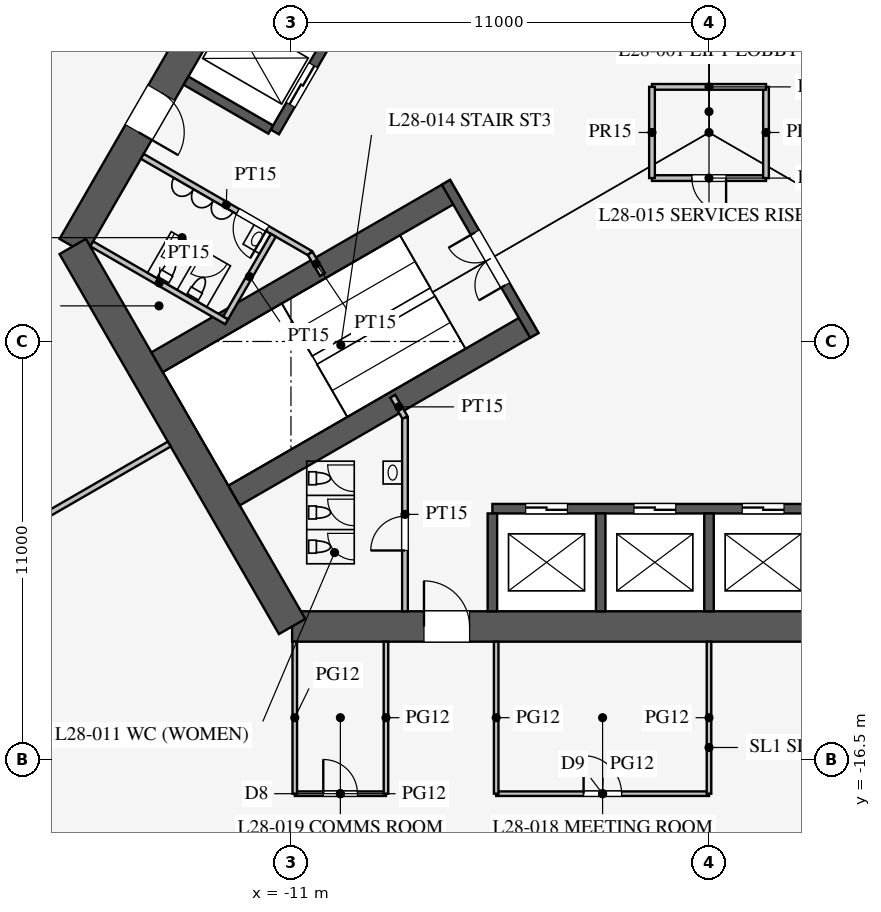
"""IFC4 building model, lengths in metres.
Left out: names, types, materials, properties, quantities, classifications, styles, units other than length and angle.
Written with IfcOpenShell. Run it as: python <this file> out.ifc"""

import sys

from ifc_helpers import new_model, si_unit, direction, frame, frame_2d, origin, place, context, subcontext, project, spatial, rectangle, extrude, element, fill, save


model = new_model("IFC4")
c1 = context("Model", 3, precision=1e-05, world=origin(), true_north=direction((0.0, 1.0)))
c2 = subcontext(c1, "Body", "Model", "MODEL_VIEW")
j1 = project(units=[si_unit("LENGTHUNIT", "METRE"), si_unit("PLANEANGLEUNIT", "RADIAN")], contexts=[c1])
p1 = place(None, origin())
s1 = spatial("IfcSite", under=j1, at=p1, CompositionType="ELEMENT")
p2 = place(p1, origin())
s2 = spatial("IfcBuilding", under=s1, at=p2, CompositionType="ELEMENT")
p3 = place(p2, frame((0.0, 0.0, 124.1)))
s3 = spatial("IfcBuildingStorey", under=s2, at=p3, CompositionType="ELEMENT", Elevation=124.1)
p4 = place(p3, frame((-10.97, -13.0, 0.0), z_axis=(0.0, 0.0, 1.0), x_axis=(1.0, 0.0, 0.0)))
e1 = element("IfcWall", 1, at=p4, inside=s3, PredefinedType="SHEAR", context=c2, shape_type="SweptSolid", body=[
    extrude(rectangle(XDim=21.939, YDim=0.8, at=frame_2d((10.97, 0.0))), origin(), (0.0, 0.0, 1.0), 4.2),
])
p5 = place(p4, frame((17.27, 0.0, 0.0)))
e2 = element("IfcOpeningElement", 2, at=p5, cuts=e1, PredefinedType="OPENING", context=c2, shape_type="SweptSolid", body=[
    extrude(rectangle(XDim=1.2, YDim=2.1, at=frame_2d((0.6, 1.05))), frame((0.0, 0.41, 0.0), z_axis=(0.0, -1.0, 0.0), x_axis=(1.0, 0.0, 0.0)), (0.0, 0.0, 1.0), 0.82),
])
p6 = place(p4, frame((3.47, 0.0, 0.0)))
e3 = element("IfcOpeningElement", 3, at=p6, cuts=e1, PredefinedType="OPENING", context=c2, shape_type="SweptSolid", body=[
    extrude(rectangle(XDim=1.2, YDim=2.1, at=frame_2d((0.6, 1.05))), frame((0.0, 0.41, 0.0), z_axis=(0.0, -1.0, 0.0), x_axis=(1.0, 0.0, 0.0)), (0.0, 0.0, 1.0), 0.82),
])
p7 = place(p3, frame((-5.773, 16.0, 0.0), z_axis=(0.0, 0.0, 1.0), x_axis=(-0.500002442456, -0.866023993627, 0.0)))
e4 = element("IfcWall", 4, at=p7, inside=s3, PredefinedType="SHEAR", context=c2, shape_type="SweptSolid", body=[
    extrude(rectangle(XDim=21.939, YDim=0.8, at=frame_2d((10.97, 0.0))), origin(), (0.0, 0.0, 1.0), 4.2),
])
p8 = place(p7, frame((17.27, 0.0, 0.0)))
e5 = element("IfcOpeningElement", 5, at=p8, cuts=e4, PredefinedType="OPENING", context=c2, shape_type="SweptSolid", body=[
    extrude(rectangle(XDim=1.2, YDim=2.1, at=frame_2d((0.6, 1.05))), frame((0.0, 0.41, 0.0), z_axis=(0.0, -1.0, 0.0), x_axis=(1.0, 0.0, 0.0)), (0.0, 0.0, 1.0), 0.82),
])
p9 = place(p7, frame((3.47, 0.0, 0.0)))
e6 = element("IfcOpeningElement", 6, at=p9, cuts=e4, PredefinedType="OPENING", context=c2, shape_type="SweptSolid", body=[
    extrude(rectangle(XDim=1.2, YDim=2.1, at=frame_2d((0.6, 1.05))), frame((0.0, 0.41, 0.0), z_axis=(0.0, -1.0, 0.0), x_axis=(1.0, 0.0, 0.0)), (0.0, 0.0, 1.0), 0.82),
])
p10 = place(p3, frame((-16.743, -3.0, 0.0), z_axis=(0.0, 0.0, 1.0), x_axis=(0.499995765644, -0.866027848477, 0.0)))
e7 = element("IfcWall", 7, at=p10, inside=s3, PredefinedType="SHEAR", context=c2, shape_type="SweptSolid", body=[
    extrude(rectangle(XDim=11.547, YDim=0.8, at=frame_2d((5.773, 0.0))), origin(), (0.0, 0.0, 1.0), 4.2),
])
p11 = place(p3, frame((-5.7, -9.9, 0.0), z_axis=(0.0, 0.0, 1.0), x_axis=(1.0, 0.0, 0.0)))
e8 = element("IfcWall", 8, at=p11, inside=s3, PredefinedType="SHEAR", context=c2, shape_type="SweptSolid", body=[
    extrude(rectangle(XDim=11.4, YDim=0.25, at=frame_2d((5.7, 0.0))), origin(), (0.0, 0.0, 1.0), 4.2),
])
p12 = place(p11, frame((0.875, 0.0, 0.0)))
e9 = element("IfcOpeningElement", 9, at=p12, cuts=e8, PredefinedType="OPENING", context=c2, shape_type="SweptSolid", body=[
    extrude(rectangle(XDim=1.1, YDim=2.2, at=frame_2d((0.55, 1.1))), frame((0.0, 0.135, 0.0), z_axis=(0.0, -1.0, 0.0), x_axis=(1.0, 0.0, 0.0)), (0.0, 0.0, 1.0), 0.27),
])
p13 = place(p11, frame((3.725, 0.0, 0.0)))
e10 = element("IfcOpeningElement", 10, at=p13, cuts=e8, PredefinedType="OPENING", context=c2, shape_type="SweptSolid", body=[
    extrude(rectangle(XDim=1.1, YDim=2.2, at=frame_2d((0.55, 1.1))), frame((0.0, 0.135, 0.0), z_axis=(0.0, -1.0, 0.0), x_axis=(1.0, 0.0, 0.0)), (0.0, 0.0, 1.0), 0.27),
])
p14 = place(p11, frame((6.575, 0.0, 0.0)))
e11 = element("IfcOpeningElement", 11, at=p14, cuts=e8, PredefinedType="OPENING", context=c2, shape_type="SweptSolid", body=[
    extrude(rectangle(XDim=1.1, YDim=2.2, at=frame_2d((0.55, 1.1))), frame((0.0, 0.135, 0.0), z_axis=(0.0, -1.0, 0.0), x_axis=(1.0, 0.0, 0.0)), (0.0, 0.0, 1.0), 0.27),
])
p15 = place(p11, frame((9.425, 0.0, 0.0)))
e12 = element("IfcOpeningElement", 12, at=p15, cuts=e8, PredefinedType="OPENING", context=c2, shape_type="SweptSolid", body=[
    extrude(rectangle(XDim=1.1, YDim=2.2, at=frame_2d((0.55, 1.1))), frame((0.0, 0.135, 0.0), z_axis=(0.0, -1.0, 0.0), x_axis=(1.0, 0.0, 0.0)), (0.0, 0.0, 1.0), 0.27),
])
for number, where, z_axis, x_axis in (
    (13, (-5.7, -10.025, 0.0), (0.0, 0.0, 1.0), (0.0, -1.0, 0.0)),
    (14, (-2.85, -10.025, 0.0), (0.0, 0.0, 1.0), (0.0, -1.0, 0.0)),
    (15, (0.0, -10.025, 0.0), (0.0, 0.0, 1.0), (0.0, -1.0, 0.0)),
):
    element("IfcWall", number, at=place(p3, frame(where, z_axis=z_axis, x_axis=x_axis)), inside=s3, PredefinedType="SHEAR", context=c2, shape_type="SweptSolid", body=[
        extrude(rectangle(XDim=2.575, YDim=0.25, at=frame_2d((1.288, 0.0))), origin(), (0.0, 0.0, 1.0), 4.2),
    ])
p16 = place(p3, frame((-5.724, 9.886, 0.0), z_axis=(0.0, 0.0, 1.0), x_axis=(-0.500001763848, -0.866024385424, 0.0)))
e16 = element("IfcWall", 16, at=p16, inside=s3, PredefinedType="SHEAR", context=c2, shape_type="SweptSolid", body=[
    extrude(rectangle(XDim=11.4, YDim=0.25, at=frame_2d((5.7, 0.0))), origin(), (0.0, 0.0, 1.0), 4.2),
])
p17 = place(p16, frame((6.525, 0.0, 0.0)))
e17 = element("IfcOpeningElement", 17, at=p17, cuts=e16, PredefinedType="OPENING", context=c2, shape_type="SweptSolid", body=[
    extrude(rectangle(XDim=1.2, YDim=2.2, at=frame_2d((0.6, 1.1))), frame((0.0, 0.135, 0.0), z_axis=(0.0, -1.0, 0.0), x_axis=(1.0, 0.0, 0.0)), (0.0, 0.0, 1.0), 0.27),
])
p18 = place(p16, frame((9.375, 0.0, 0.0)))
e18 = element("IfcOpeningElement", 18, at=p18, cuts=e16, PredefinedType="OPENING", context=c2, shape_type="SweptSolid", body=[
    extrude(rectangle(XDim=1.2, YDim=2.2, at=frame_2d((0.6, 1.1))), frame((0.0, 0.135, 0.0), z_axis=(0.0, -1.0, 0.0), x_axis=(1.0, 0.0, 0.0)), (0.0, 0.0, 1.0), 0.27),
])
p19 = place(p3, frame((-11.532, 0.076, 0.0), z_axis=(0.0, 0.0, 1.0), x_axis=(-0.866005588531, 0.500034319456, 0.0)))
e19 = element("IfcWall", 19, at=p19, inside=s3, PredefinedType="SHEAR", context=c2, shape_type="SweptSolid", body=[
    extrude(rectangle(XDim=2.575, YDim=0.25, at=frame_2d((1.288, 0.0))), origin(), (0.0, 0.0, 1.0), 4.2),
])
for number, where, z_axis, x_axis in (
    (20, (-6.663, -1.509, 0.0), (0.0, 0.0, 1.0), (-0.866, -0.5, 0.0)),
    (21, (-4.638, -5.016, 0.0), (0.0, 0.0, 1.0), (-0.866, -0.5, 0.0)),
):
    element("IfcWall", number, at=place(p3, frame(where, z_axis=z_axis, x_axis=x_axis)), inside=s3, PredefinedType="SHEAR", context=c2, shape_type="SweptSolid", body=[
        extrude(rectangle(XDim=9.075, YDim=0.6, at=frame_2d((4.538, 0.0))), origin(), (0.0, 0.0, 1.0), 4.2),
    ])
p20 = place(p3, frame((-6.922, -1.312, 0.0), z_axis=(0.0, 0.0, 1.0), x_axis=(0.499984536904, -0.866034331223, 0.0)))
e22 = element("IfcWall", 22, at=p20, inside=s3, PredefinedType="SHEAR", context=c2, shape_type="SweptSolid", body=[
    extrude(rectangle(XDim=4.65, YDim=0.25, at=frame_2d((2.325, 0.0))), origin(), (0.0, 0.0, 1.0), 4.2),
])
p21 = place(p20, frame((1.525, 0.0, 0.0)))
e23 = element("IfcOpeningElement", 23, at=p21, cuts=e22, PredefinedType="OPENING", context=c2, shape_type="SweptSolid", body=[
    extrude(rectangle(XDim=1.6, YDim=2.1, at=frame_2d((0.8, 1.05))), frame((0.0, 0.135, 0.0), z_axis=(0.0, -1.0, 0.0), x_axis=(1.0, 0.0, 0.0)), (0.0, 0.0, 1.0), 0.27),
])
p22 = place(p3, frame((-8.0, -7.5, 0.0), z_axis=(0.0, 0.0, 1.0), x_axis=(0.0, -1.0, 0.0)))
e24 = element("IfcWall", 24, at=p22, inside=s3, PredefinedType="PARTITIONING", context=c2, shape_type="SweptSolid", body=[
    extrude(rectangle(XDim=5.1, YDim=0.15, at=frame_2d((2.55, 0.0))), origin(), (0.0, 0.0, 1.0), 4.0),
])
p23 = place(p22, frame((2.6, 0.0, 0.0)))
e25 = element("IfcOpeningElement", 25, at=p23, cuts=e24, PredefinedType="OPENING", context=c2, shape_type="SweptSolid", body=[
    extrude(rectangle(XDim=0.9, YDim=2.1, at=frame_2d((0.45, 1.05))), frame((0.0, 0.085, 0.0), z_axis=(0.0, -1.0, 0.0), x_axis=(1.0, 0.0, 0.0)), (0.0, 0.0, 1.0), 0.17),
])
p24 = place(p3, frame((-10.495, -3.178, 0.0), z_axis=(0.0, 0.0, 1.0), x_axis=(-0.86602216432, 0.500005610874, 0.0)))
e26 = element("IfcWall", 26, at=p24, inside=s3, PredefinedType="PARTITIONING", context=c2, shape_type="SweptSolid", body=[
    extrude(rectangle(XDim=5.1, YDim=0.15, at=frame_2d((2.55, 0.0))), origin(), (0.0, 0.0, 1.0), 4.0),
])
p25 = place(p24, frame((1.3, 0.0, 0.0)))
e27 = element("IfcOpeningElement", 27, at=p25, cuts=e26, PredefinedType="OPENING", context=c2, shape_type="SweptSolid", body=[
    extrude(rectangle(XDim=0.9, YDim=2.1, at=frame_2d((0.45, 1.05))), frame((0.0, 0.085, 0.0), z_axis=(0.0, -1.0, 0.0), x_axis=(1.0, 0.0, 0.0)), (0.0, 0.0, 1.0), 0.17),
])
for number, where, z_axis, x_axis in (
    (28, (-10.495, -3.178, 0.0), (0.0, 0.0, 1.0), (0.5, -0.866, 0.0)),
    (29, (-8.0, -7.5, 0.0), (0.0, 0.0, 1.0), (-0.5, 0.866, 0.0)),
):
    element("IfcWall", number, at=place(p3, frame(where, z_axis=z_axis, x_axis=x_axis)), inside=s3, PredefinedType="PARTITIONING", context=c2, shape_type="SweptSolid", body=[
        extrude(rectangle(XDim=0.645, YDim=0.15, at=frame_2d((0.323, 0.0))), origin(), (0.0, 0.0, 1.0), 4.0),
    ])
p26 = place(p3, frame((-12.691, -4.982, 0.0), z_axis=(0.0, 0.0, 1.0), x_axis=(-0.8660249478, 0.500000789788, 0.0)))
e30 = element("IfcWall", 30, at=p26, inside=s3, PredefinedType="PARTITIONING", context=c2, shape_type="SweptSolid", body=[
    extrude(rectangle(XDim=4.1, YDim=0.15, at=frame_2d((2.05, 0.0))), origin(), (0.0, 0.0, 1.0), 4.0),
])
p27 = place(p3, frame((-11.464, -2.706, 0.0), z_axis=(0.0, 0.0, 1.0), x_axis=(-0.50001992892, -0.866013897511, 0.0)))
e31 = element("IfcWall", 31, at=p27, inside=s3, PredefinedType="PARTITIONING", context=c2, shape_type="SweptSolid", body=[
    extrude(rectangle(XDim=2.51, YDim=0.15, at=frame_2d((1.255, 0.0))), origin(), (0.0, 0.0, 1.0), 4.0),
])
p28 = place(p3, frame((-1.5, -1.2, 0.0), z_axis=(0.0, 0.0, 1.0), x_axis=(1.0, 0.0, 0.0)))
e32 = element("IfcWall", 32, at=p28, inside=s3, PredefinedType="PARTITIONING", context=c2, shape_type="SweptSolid", body=[
    extrude(rectangle(XDim=3.0, YDim=0.15, at=frame_2d((1.5, 0.0))), origin(), (0.0, 0.0, 1.0), 4.0),
])
p29 = place(p28, frame((1.05, 0.0, 0.0)))
e33 = element("IfcOpeningElement", 33, at=p29, cuts=e32, PredefinedType="OPENING", context=c2, shape_type="SweptSolid", body=[
    extrude(rectangle(XDim=0.9, YDim=2.1, at=frame_2d((0.45, 1.05))), frame((0.0, 0.085, 0.0), z_axis=(0.0, -1.0, 0.0), x_axis=(1.0, 0.0, 0.0)), (0.0, 0.0, 1.0), 0.17),
])
p30 = place(p3, frame((1.5, -1.2, 0.0), z_axis=(0.0, 0.0, 1.0), x_axis=(0.0, 1.0, 0.0)))
e34 = element("IfcWall", 34, at=p30, inside=s3, PredefinedType="PARTITIONING", context=c2, shape_type="SweptSolid", body=[
    extrude(rectangle(XDim=2.4, YDim=0.15, at=frame_2d((1.2, 0.0))), origin(), (0.0, 0.0, 1.0), 4.0),
])
p31 = place(p3, frame((1.5, 1.2, 0.0), z_axis=(0.0, 0.0, 1.0), x_axis=(-1.0, 0.0, 0.0)))
e35 = element("IfcWall", 35, at=p31, inside=s3, PredefinedType="PARTITIONING", context=c2, shape_type="SweptSolid", body=[
    extrude(rectangle(XDim=3.0, YDim=0.15, at=frame_2d((1.5, 0.0))), origin(), (0.0, 0.0, 1.0), 4.0),
])
p32 = place(p3, frame((-1.5, 1.2, 0.0), z_axis=(0.0, 0.0, 1.0), x_axis=(0.0, -1.0, 0.0)))
e36 = element("IfcWall", 36, at=p32, inside=s3, PredefinedType="PARTITIONING", context=c2, shape_type="SweptSolid", body=[
    extrude(rectangle(XDim=2.4, YDim=0.15, at=frame_2d((1.2, 0.0))), origin(), (0.0, 0.0, 1.0), 4.0),
])
p33 = place(p3, frame((-14.203, -8.2, 0.0), z_axis=(0.0, 0.0, 1.0), x_axis=(-0.866024668836, -0.500001272966, 0.0)))
e37 = element("IfcWall", 37, at=p33, inside=s3, PredefinedType="PARTITIONING", context=c2, shape_type="SweptSolid", body=[
    extrude(rectangle(XDim=16.65, YDim=0.15, at=frame_2d((8.325, 0.0))), origin(), (0.0, 0.0, 1.0), 2.3),
])
p34 = place(p3, frame((-10.9, -17.4, 0.0), z_axis=(0.0, 0.0, 1.0), x_axis=(1.0, 0.0, 0.0)))
e38 = element("IfcWall", 38, at=p34, inside=s3, PredefinedType="PARTITIONING", context=c2, shape_type="SweptSolid", body=[
    extrude(rectangle(XDim=2.4, YDim=0.12, at=frame_2d((1.2, 0.0))), origin(), (0.0, 0.0, 1.0), 2.9),
])
p35 = place(p34, frame((0.75, 0.0, 0.15)))
e39 = element("IfcOpeningElement", 39, at=p35, cuts=e38, PredefinedType="OPENING", context=c2, shape_type="SweptSolid", body=[
    extrude(rectangle(XDim=0.9, YDim=2.1, at=frame_2d((0.45, 1.05))), frame((0.0, 0.07, 0.0), z_axis=(0.0, -1.0, 0.0), x_axis=(1.0, 0.0, 0.0)), (0.0, 0.0, 1.0), 0.14),
])
p36 = place(p3, frame((-5.6, -17.4, 0.0), z_axis=(0.0, 0.0, 1.0), x_axis=(1.0, 0.0, 0.0)))
e40 = element("IfcWall", 40, at=p36, inside=s3, PredefinedType="PARTITIONING", context=c2, shape_type="SweptSolid", body=[
    extrude(rectangle(XDim=5.6, YDim=0.12, at=frame_2d((2.8, 0.0))), origin(), (0.0, 0.0, 1.0), 2.9),
])
p37 = place(p36, frame((2.3, 0.0, 0.15)))
e41 = element("IfcOpeningElement", 41, at=p37, cuts=e40, PredefinedType="OPENING", context=c2, shape_type="SweptSolid", body=[
    extrude(rectangle(XDim=1.0, YDim=2.1, at=frame_2d((0.5, 1.05))), frame((0.0, 0.07, 0.0), z_axis=(0.0, -1.0, 0.0), x_axis=(1.0, 0.0, 0.0)), (0.0, 0.0, 1.0), 0.14),
])
for number, where, z_axis, x_axis in (
    (42, (0.0, -13.4, 0.0), (0.0, 0.0, 1.0), (0.0, -1.0, 0.0)),
    (43, (-10.9, -13.4, 0.0), (0.0, 0.0, 1.0), (0.0, -1.0, 0.0)),
    (44, (-5.6, -13.4, 0.0), (0.0, 0.0, 1.0), (0.0, -1.0, 0.0)),
    (45, (-8.5, -13.4, 0.0), (0.0, 0.0, 1.0), (0.0, -1.0, 0.0)),
):
    element("IfcWall", number, at=place(p3, frame(where, z_axis=z_axis, x_axis=x_axis)), inside=s3, PredefinedType="PARTITIONING", context=c2, shape_type="SweptSolid", body=[
        extrude(rectangle(XDim=4.0, YDim=0.12, at=frame_2d((2.0, 0.0))), origin(), (0.0, 0.0, 1.0), 2.9),
    ])
p38 = place(p23, frame((0.9, 0.0, 0.0), z_axis=(0.0, 0.0, 1.0), x_axis=(-1.0, 0.0, 0.0)))
e46 = element("IfcDoor", 46, at=p38, inside=s3, OperationType="SINGLE_SWING_LEFT", PredefinedType="DOOR", context=c2, shape_type="SweptSolid", body=[
    extrude(rectangle(XDim=0.9, YDim=2.1, at=frame_2d((0.45, 1.05))), frame((0.0, 0.025, 0.0), z_axis=(0.0, -1.0, 0.0), x_axis=(1.0, 0.0, 0.0)), (0.0, 0.0, 1.0), 0.05),
])
fill(e25, e46)
p39 = place(p25, origin())
e47 = element("IfcDoor", 47, at=p39, inside=s3, OperationType="SINGLE_SWING_LEFT", PredefinedType="DOOR", context=c2, shape_type="SweptSolid", body=[
    extrude(rectangle(XDim=0.9, YDim=2.1, at=frame_2d((0.45, 1.05))), frame((0.0, 0.025, 0.0), z_axis=(0.0, -1.0, 0.0), x_axis=(1.0, 0.0, 0.0)), (0.0, 0.0, 1.0), 0.05),
])
fill(e27, e47)
p40 = place(p29, frame((0.9, 0.0, 0.0), z_axis=(0.0, 0.0, 1.0), x_axis=(-1.0, 0.0, 0.0)))
e48 = element("IfcDoor", 48, at=p40, inside=s3, OperationType="SINGLE_SWING_LEFT", PredefinedType="DOOR", context=c2, shape_type="SweptSolid", body=[
    extrude(rectangle(XDim=0.9, YDim=2.1, at=frame_2d((0.45, 1.05))), frame((0.0, 0.025, 0.0), z_axis=(0.0, -1.0, 0.0), x_axis=(1.0, 0.0, 0.0)), (0.0, 0.0, 1.0), 0.05),
])
fill(e33, e48)
p41 = place(p21, frame((1.6, 0.0, 0.0), z_axis=(0.0, 0.0, 1.0), x_axis=(-1.0, 0.0, 0.0)))
e49 = element("IfcDoor", 49, at=p41, inside=s3, OperationType="DOUBLE_DOOR_SINGLE_SWING", PredefinedType="DOOR", context=c2, shape_type="SweptSolid", body=[
    extrude(rectangle(XDim=1.6, YDim=2.1, at=frame_2d((0.8, 1.05))), frame((0.0, 0.025, 0.0), z_axis=(0.0, -1.0, 0.0), x_axis=(1.0, 0.0, 0.0)), (0.0, 0.0, 1.0), 0.05),
])
fill(e23, e49)
p42 = place(p6, origin())
e50 = element("IfcDoor", 50, at=p42, inside=s3, OperationType="SINGLE_SWING_LEFT", PredefinedType="DOOR", context=c2, shape_type="SweptSolid", body=[
    extrude(rectangle(XDim=1.2, YDim=2.1, at=frame_2d((0.6, 1.05))), frame((0.0, 0.025, 0.0), z_axis=(0.0, -1.0, 0.0), x_axis=(1.0, 0.0, 0.0)), (0.0, 0.0, 1.0), 0.05),
])
fill(e3, e50)
p43 = place(p8, origin())
e51 = element("IfcDoor", 51, at=p43, inside=s3, OperationType="SINGLE_SWING_RIGHT", PredefinedType="DOOR", context=c2, shape_type="SweptSolid", body=[
    extrude(rectangle(XDim=1.2, YDim=2.1, at=frame_2d((0.6, 1.05))), frame((0.0, 0.025, 0.0), z_axis=(0.0, -1.0, 0.0), x_axis=(1.0, 0.0, 0.0)), (0.0, 0.0, 1.0), 0.05),
])
fill(e5, e51)
p44 = place(p37, origin())
e52 = element("IfcDoor", 52, at=p44, inside=s3, OperationType="SINGLE_SWING_LEFT", PredefinedType="DOOR", context=c2, shape_type="SweptSolid", body=[
    extrude(rectangle(XDim=1.0, YDim=2.1, at=frame_2d((0.5, 1.05))), frame((0.0, 0.025, 0.0), z_axis=(0.0, -1.0, 0.0), x_axis=(1.0, 0.0, 0.0)), (0.0, 0.0, 1.0), 0.05),
])
fill(e41, e52)
p45 = place(p35, origin())
e53 = element("IfcDoor", 53, at=p45, inside=s3, OperationType="SINGLE_SWING_LEFT", PredefinedType="DOOR", context=c2, shape_type="SweptSolid", body=[
    extrude(rectangle(XDim=0.9, YDim=2.1, at=frame_2d((0.45, 1.05))), frame((0.0, 0.025, 0.0), z_axis=(0.0, -1.0, 0.0), x_axis=(1.0, 0.0, 0.0)), (0.0, 0.0, 1.0), 0.05),
])
fill(e39, e53)
p46 = place(p12, origin())
e54 = element("IfcDoor", 54, at=p46, inside=s3, OperationType="DOUBLE_DOOR_SLIDING", PredefinedType="DOOR", context=c2, shape_type="SweptSolid", body=[
    extrude(rectangle(XDim=1.1, YDim=2.2, at=frame_2d((0.55, 1.1))), frame((0.0, 0.025, 0.0), z_axis=(0.0, -1.0, 0.0), x_axis=(1.0, 0.0, 0.0)), (0.0, 0.0, 1.0), 0.05),
])
fill(e9, e54)
p47 = place(p13, origin())
e55 = element("IfcDoor", 55, at=p47, inside=s3, OperationType="DOUBLE_DOOR_SLIDING", PredefinedType="DOOR", context=c2, shape_type="SweptSolid", body=[
    extrude(rectangle(XDim=1.1, YDim=2.2, at=frame_2d((0.55, 1.1))), frame((0.0, 0.025, 0.0), z_axis=(0.0, -1.0, 0.0), x_axis=(1.0, 0.0, 0.0)), (0.0, 0.0, 1.0), 0.05),
])
fill(e10, e55)
p48 = place(p14, origin())
e56 = element("IfcDoor", 56, at=p48, inside=s3, OperationType="DOUBLE_DOOR_SLIDING", PredefinedType="DOOR", context=c2, shape_type="SweptSolid", body=[
    extrude(rectangle(XDim=1.1, YDim=2.2, at=frame_2d((0.55, 1.1))), frame((0.0, 0.025, 0.0), z_axis=(0.0, -1.0, 0.0), x_axis=(1.0, 0.0, 0.0)), (0.0, 0.0, 1.0), 0.05),
])
fill(e11, e56)
p49 = place(p18, origin())
e57 = element("IfcDoor", 57, at=p49, inside=s3, OperationType="DOUBLE_DOOR_SLIDING", PredefinedType="DOOR", context=c2, shape_type="SweptSolid", body=[
    extrude(rectangle(XDim=1.2, YDim=2.2, at=frame_2d((0.6, 1.1))), frame((0.0, 0.025, 0.0), z_axis=(0.0, -1.0, 0.0), x_axis=(1.0, 0.0, 0.0)), (0.0, 0.0, 1.0), 0.05),
])
fill(e18, e57)
save(model, sys.argv[1])
